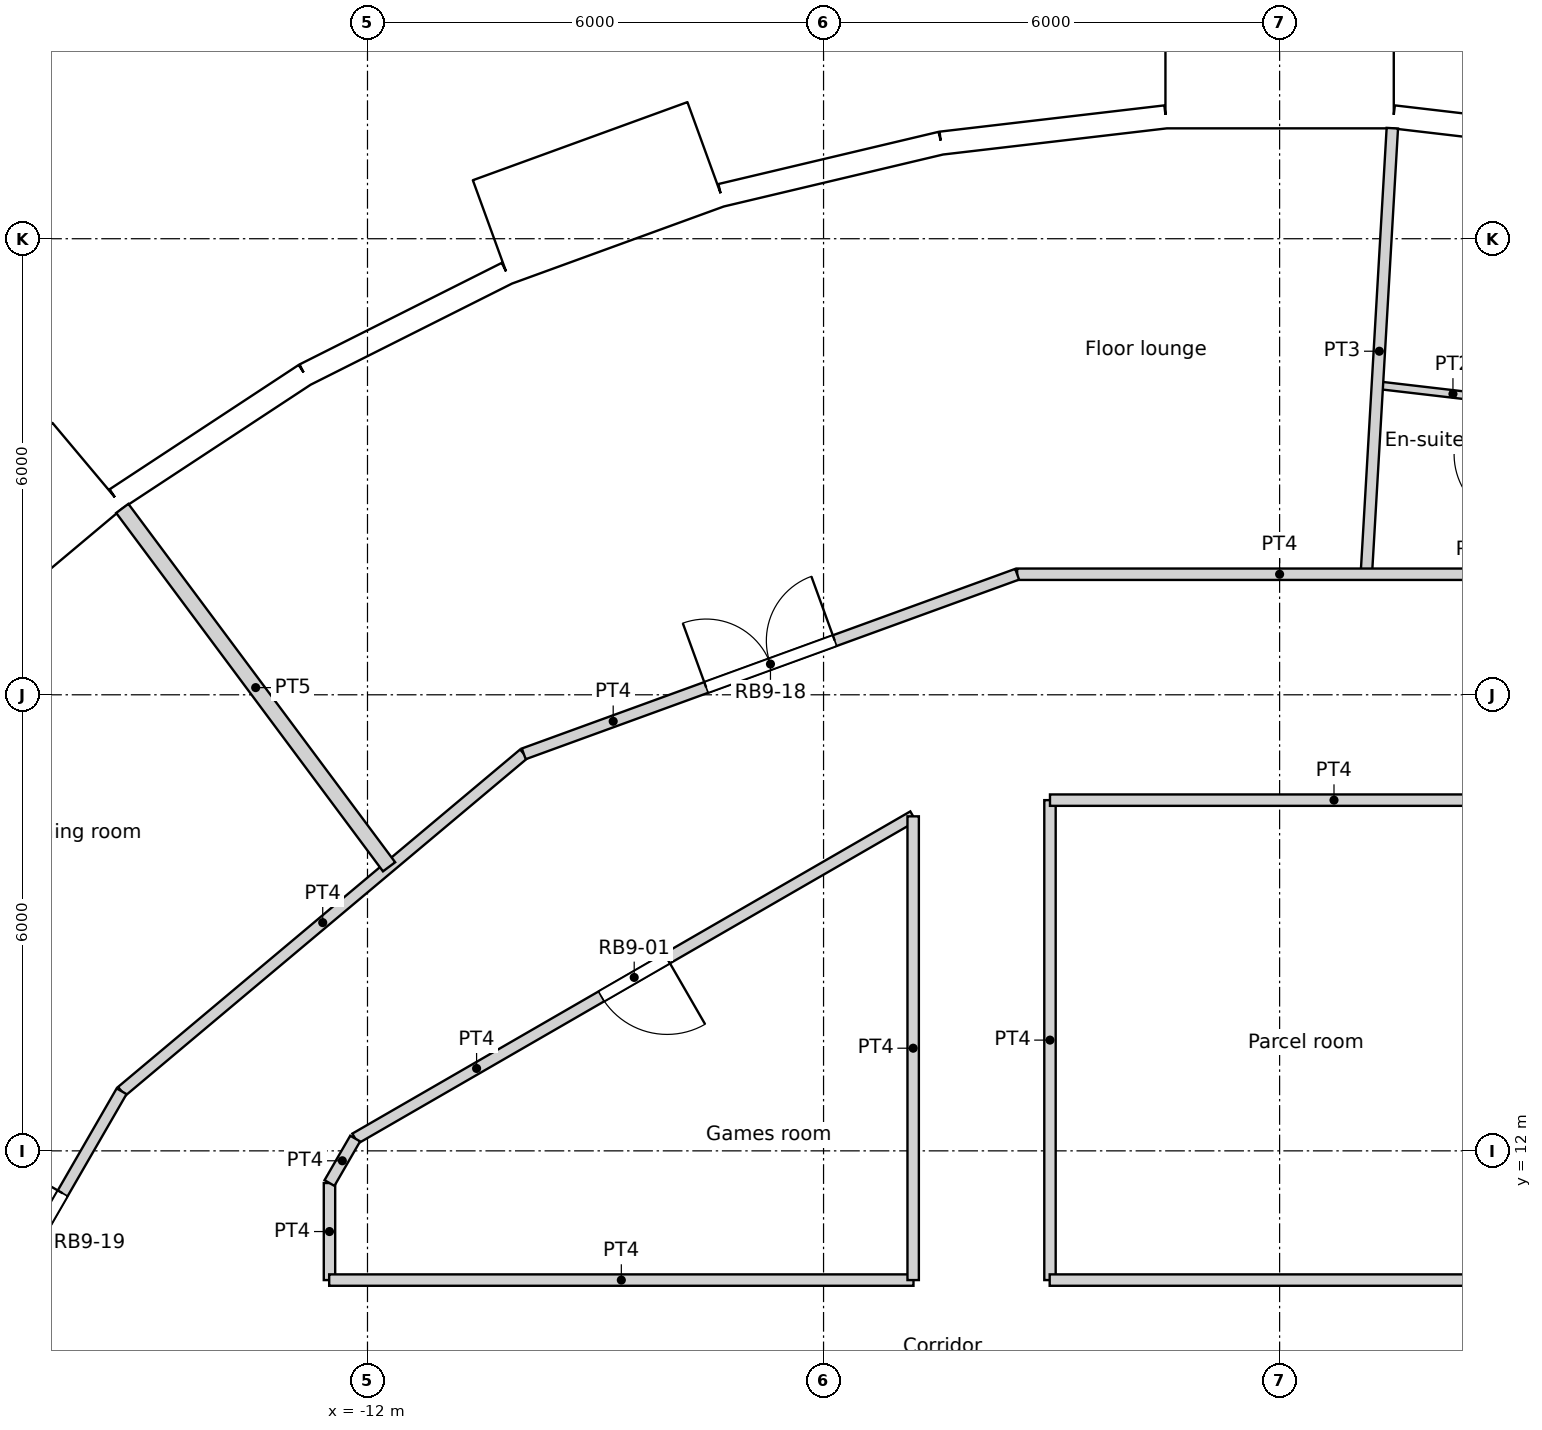
"""IFC4 building model, lengths in metres.
Left out: names, types, materials, properties, quantities, classifications, styles, units other than length and angle.
Written with IfcOpenShell. Run it as: python <this file> out.ifc"""

import sys

from ifc_helpers import new_model, si_unit, direction, frame, frame_2d, origin, origin_2d, place, context, subcontext, project, spatial, rectangle, circle, extrude, element, fill, save


model = new_model("IFC4")
c1 = context("Model", 3, precision=1e-05, world=origin(), true_north=direction((0.0, 1.0)))
c2 = subcontext(c1, "Body", "Model", "MODEL_VIEW")
j1 = project(units=[si_unit("LENGTHUNIT", "METRE"), si_unit("PLANEANGLEUNIT", "RADIAN")], contexts=[c1])
p1 = place(None, origin())
s1 = spatial("IfcSite", under=j1, at=p1, CompositionType="ELEMENT")
p2 = place(p1, origin())
s2 = spatial("IfcBuilding", under=s1, at=p2, CompositionType="ELEMENT")
p3 = place(p2, frame((0.0, 0.0, 212.4)))
s3 = spatial("IfcBuildingStorey", under=s2, at=p3, CompositionType="ELEMENT", Elevation=212.4)
for number, where, z_axis, x_axis in (
    (1, (-1.427, 24.506, 0.0), (0.0, 0.0, 1.0), (1.0, 0.0, 0.0)),
    (2, (-7.04, 23.516, 0.0), (0.0, 0.0, 1.0), (1.0, 0.0, 0.0)),
    (3, (-12.274, 21.259, 0.0), (0.0, 0.0, 1.0), (1.0, 0.0, 0.0)),
):
    element("IfcColumn", number, at=place(p3, frame(where, z_axis=z_axis, x_axis=x_axis)), inside=s3, PredefinedType="COLUMN", context=c2, shape_type="SweptSolid", body=[
        extrude(circle(Radius=0.6, at=origin_2d()), origin(), (0.0, 0.0, 1.0), 3.6),
    ])
for number, where, z_axis, x_axis in (
    (4, (1.406, 18.77, 0.0), (0.0, 0.0, 1.0), (1.0, 0.0, 0.0)),
    (5, (-4.188, 18.35, 0.0), (0.0, 0.0, 1.0), (1.0, 0.0, 0.0)),
    (6, (-9.411, 16.301, 0.0), (0.0, 0.0, 1.0), (1.0, 0.0, 0.0)),
    (7, (-13.798, 12.802, 0.0), (0.0, 0.0, 1.0), (1.0, 0.0, 0.0)),
):
    element("IfcColumn", number, at=place(p3, frame(where, z_axis=z_axis, x_axis=x_axis)), inside=s3, PredefinedType="COLUMN", context=c2, shape_type="SweptSolid", body=[
        extrude(circle(Radius=0.65, at=origin_2d()), origin(), (0.0, 0.0, 1.0), 3.6),
    ])
p4 = place(p3, frame((4.454, 25.258, 0.0), z_axis=(0.0, 0.0, 1.0), x_axis=(-0.993235542767, 0.116116995244, 0.0)))
e8 = element("IfcWall", 8, at=p4, inside=s3, PredefinedType="SOLIDWALL", context=c2, shape_type="SweptSolid", body=[
    extrude(rectangle(XDim=2.973, YDim=0.3, at=frame_2d((1.486, 0.0))), origin(), (0.0, 0.0, 1.0), 3.3),
])
p5 = place(p4, frame((1.486, 0.0, 1.55)))
e9 = element("IfcOpeningElement", 9, at=p5, cuts=e8, PredefinedType="OPENING", context=c2, shape_type="SweptSolid", body=[
    extrude(circle(Radius=0.9, at=origin_2d()), frame((0.0, 0.16, 0.0), z_axis=(0.0, -1.0, 0.0), x_axis=(1.0, 0.0, 0.0)), (0.0, 0.0, 1.0), 0.32),
])
p6 = place(p3, frame((1.5, 26.179, -0.3), z_axis=(0.0, 0.0, 1.0), x_axis=(-1.0, 0.0, 0.0)))
e10 = element("IfcWall", 10, at=p6, inside=s3, PredefinedType="ELEMENTEDWALL", context=c2, shape_type="SweptSolid", body=[
    extrude(rectangle(XDim=3.0, YDim=1.45, at=frame_2d((1.5, 0.0))), origin(), (0.0, 0.0, 1.0), 3.6),
])
p7 = place(p6, frame((1.5, 0.0, 1.85)))
e11 = element("IfcOpeningElement", 11, at=p7, cuts=e10, PredefinedType="OPENING", context=c2, shape_type="SweptSolid", body=[
    extrude(circle(Radius=0.9, at=origin_2d()), frame((0.0, 0.735, 0.0), z_axis=(0.0, -1.0, 0.0), x_axis=(1.0, 0.0, 0.0)), (0.0, 0.0, 1.0), 1.47),
])
p8 = place(p3, frame((-1.501, 25.603, 0.0), z_axis=(0.0, 0.0, 1.0), x_axis=(-0.993235542767, -0.116116995244, 0.0)))
e12 = element("IfcWall", 12, at=p8, inside=s3, PredefinedType="SOLIDWALL", context=c2, shape_type="SweptSolid", body=[
    extrude(rectangle(XDim=2.973, YDim=0.3, at=frame_2d((1.486, 0.0))), origin(), (0.0, 0.0, 1.0), 3.3),
])
p9 = place(p8, frame((1.486, 0.0, 1.55)))
e13 = element("IfcOpeningElement", 13, at=p9, cuts=e12, PredefinedType="OPENING", context=c2, shape_type="SweptSolid", body=[
    extrude(circle(Radius=0.9, at=origin_2d()), frame((0.0, 0.16, 0.0), z_axis=(0.0, -1.0, 0.0), x_axis=(1.0, 0.0, 0.0)), (0.0, 0.0, 1.0), 0.32),
])
p10 = place(p3, frame((-4.454, 25.258, 0.0), z_axis=(0.0, 0.0, 1.0), x_axis=(-0.973049746156, -0.230595298102, 0.0)))
e14 = element("IfcWall", 14, at=p10, inside=s3, PredefinedType="SOLIDWALL", context=c2, shape_type="SweptSolid", body=[
    extrude(rectangle(XDim=2.973, YDim=0.3, at=frame_2d((1.486, 0.0))), origin(), (0.0, 0.0, 1.0), 3.3),
])
p11 = place(p10, frame((1.486, 0.0, 1.55)))
e15 = element("IfcOpeningElement", 15, at=p11, cuts=e14, PredefinedType="OPENING", context=c2, shape_type="SweptSolid", body=[
    extrude(circle(Radius=0.9, at=origin_2d()), frame((0.0, 0.16, 0.0), z_axis=(0.0, -1.0, 0.0), x_axis=(1.0, 0.0, 0.0)), (0.0, 0.0, 1.0), 0.32),
])
p12 = place(p3, frame((-7.544, 25.113, -0.3), z_axis=(0.0, 0.0, 1.0), x_axis=(-0.939686455819, -0.342037080957, 0.0)))
e16 = element("IfcWall", 16, at=p12, inside=s3, PredefinedType="ELEMENTEDWALL", context=c2, shape_type="SweptSolid", body=[
    extrude(rectangle(XDim=3.0, YDim=1.45, at=frame_2d((1.5, 0.0))), origin(), (0.0, 0.0, 1.0), 3.6),
])
p13 = place(p12, frame((1.5, 0.0, 1.85)))
e17 = element("IfcOpeningElement", 17, at=p13, cuts=e16, PredefinedType="OPENING", context=c2, shape_type="SweptSolid", body=[
    extrude(circle(Radius=0.9, at=origin_2d()), frame((0.0, 0.735, 0.0), z_axis=(0.0, -1.0, 0.0), x_axis=(1.0, 0.0, 0.0)), (0.0, 0.0, 1.0), 1.47),
])
p14 = place(p3, frame((-10.167, 23.546, 0.0), z_axis=(0.0, 0.0, 1.0), x_axis=(-0.893637442555, -0.448789618045, 0.0)))
e18 = element("IfcWall", 18, at=p14, inside=s3, PredefinedType="SOLIDWALL", context=c2, shape_type="SweptSolid", body=[
    extrude(rectangle(XDim=2.973, YDim=0.3, at=frame_2d((1.486, 0.0))), origin(), (0.0, 0.0, 1.0), 3.3),
])
p15 = place(p14, frame((1.486, 0.0, 1.55)))
e19 = element("IfcOpeningElement", 19, at=p15, cuts=e18, PredefinedType="OPENING", context=c2, shape_type="SweptSolid", body=[
    extrude(circle(Radius=0.9, at=origin_2d()), frame((0.0, 0.16, 0.0), z_axis=(0.0, -1.0, 0.0), x_axis=(1.0, 0.0, 0.0)), (0.0, 0.0, 1.0), 0.32),
])
p16 = place(p3, frame((-12.824, 22.211, 0.0), z_axis=(0.0, 0.0, 1.0), x_axis=(-0.835470659512, -0.549535055382, 0.0)))
e20 = element("IfcWall", 20, at=p16, inside=s3, PredefinedType="SOLIDWALL", context=c2, shape_type="SweptSolid", body=[
    extrude(rectangle(XDim=2.973, YDim=0.3, at=frame_2d((1.487, 0.0))), origin(), (0.0, 0.0, 1.0), 3.3),
])
p17 = place(p16, frame((1.486, 0.0, 1.55)))
e21 = element("IfcOpeningElement", 21, at=p17, cuts=e20, PredefinedType="OPENING", context=c2, shape_type="SweptSolid", body=[
    extrude(circle(Radius=0.9, at=origin_2d()), frame((0.0, 0.16, 0.0), z_axis=(0.0, -1.0, 0.0), x_axis=(1.0, 0.0, 0.0)), (0.0, 0.0, 1.0), 0.32),
])
p18 = place(p3, frame((-15.678, 21.019, -0.3), z_axis=(0.0, 0.0, 1.0), x_axis=(-0.766022196139, -0.642814121673, 0.0)))
e22 = element("IfcWall", 22, at=p18, inside=s3, PredefinedType="ELEMENTEDWALL", context=c2, shape_type="SweptSolid", body=[
    extrude(rectangle(XDim=3.0, YDim=1.45, at=frame_2d((1.5, 0.0))), origin(), (0.0, 0.0, 1.0), 3.6),
])
p19 = place(p18, frame((1.5, 0.0, 1.85)))
e23 = element("IfcOpeningElement", 23, at=p19, cuts=e22, PredefinedType="OPENING", context=c2, shape_type="SweptSolid", body=[
    extrude(circle(Radius=0.9, at=origin_2d()), frame((0.0, 0.735, 0.0), z_axis=(0.0, -1.0, 0.0), x_axis=(1.0, 0.0, 0.0)), (0.0, 0.0, 1.0), 1.47),
])
p20 = place(p3, frame((-12.504, 10.3, 0.0), z_axis=(0.0, 0.0, 1.0), x_axis=(1.0, 0.0, 0.0)))
e24 = element("IfcWall", 24, at=p20, inside=s3, PredefinedType="PARTITIONING", context=c2, shape_type="SweptSolid", body=[
    extrude(rectangle(XDim=7.687, YDim=0.15, at=frame_2d((3.844, 0.0))), origin(), (0.0, 0.0, 1.0), 3.15),
])
p21 = place(p3, frame((-3.025, 10.3, 0.0), z_axis=(0.0, 0.0, 1.0), x_axis=(1.0, 0.0, 0.0)))
e25 = element("IfcWall", 25, at=p21, inside=s3, PredefinedType="PARTITIONING", context=c2, shape_type="SweptSolid", body=[
    extrude(rectangle(XDim=16.262, YDim=0.15, at=frame_2d((8.131, 0.0))), origin(), (0.0, 0.0, 1.0), 3.15),
])
p22 = place(p21, frame((7.288, 0.0, 0.0)))
e26 = element("IfcOpeningElement", 26, at=p22, cuts=e25, PredefinedType="OPENING", context=c2, shape_type="SweptSolid", body=[
    extrude(rectangle(XDim=0.95, YDim=2.1, at=frame_2d((0.475, 1.05))), frame((0.0, 0.075, 0.0), z_axis=(0.0, -1.0, 0.0), x_axis=(1.0, 0.0, 0.0)), (0.0, 0.0, 1.0), 0.15),
])
p23 = place(p3, frame((-4.821, 10.3, 0.0), z_axis=(0.0, 0.0, 1.0), x_axis=(0.0, 1.0, 0.0)))
e27 = element("IfcWall", 27, at=p23, inside=s3, PredefinedType="PARTITIONING", context=c2, shape_type="SweptSolid", body=[
    extrude(rectangle(XDim=6.101, YDim=0.15, at=frame_2d((3.05, 0.0))), origin(), (0.0, 0.0, 1.0), 3.15),
])
p24 = place(p3, frame((-12.162, 12.162, 0.0), z_axis=(0.0, 0.0, 1.0), x_axis=(0.866004766557, 0.500035743023, 0.0)))
e28 = element("IfcWall", 28, at=p24, inside=s3, PredefinedType="PARTITIONING", context=c2, shape_type="SweptSolid", body=[
    extrude(rectangle(XDim=8.477, YDim=0.15, at=frame_2d((4.239, 0.0))), origin(), (0.0, 0.0, 1.0), 3.15),
])
p25 = place(p24, frame((3.739, 0.0, 0.0)))
e29 = element("IfcOpeningElement", 29, at=p25, cuts=e28, PredefinedType="OPENING", context=c2, shape_type="SweptSolid", body=[
    extrude(rectangle(XDim=1.0, YDim=2.04, at=frame_2d((0.5, 1.02))), frame((0.0, 0.075, 0.0), z_axis=(0.0, -1.0, 0.0), x_axis=(1.0, 0.0, 0.0)), (0.0, 0.0, 1.0), 0.15),
])
p26 = place(p3, frame((-3.021, 16.614, 0.0), z_axis=(0.0, 0.0, 1.0), x_axis=(1.0, 0.0, 0.0)))
e30 = element("IfcWall", 30, at=p26, inside=s3, PredefinedType="PARTITIONING", context=c2, shape_type="SweptSolid", body=[
    extrude(rectangle(XDim=7.473, YDim=0.15, at=frame_2d((3.736, 0.0))), origin(), (0.0, 0.0, 1.0), 3.15),
])
p27 = place(p3, frame((-3.021, 10.3, 0.0), z_axis=(0.0, 0.0, 1.0), x_axis=(0.0, 1.0, 0.0)))
e31 = element("IfcWall", 31, at=p27, inside=s3, PredefinedType="PARTITIONING", context=c2, shape_type="SweptSolid", body=[
    extrude(rectangle(XDim=6.314, YDim=0.15, at=frame_2d((3.157, 0.0))), origin(), (0.0, 0.0, 1.0), 3.15),
])
p28 = place(p3, frame((-3.453, 19.586, 0.0), z_axis=(0.0, 0.0, 1.0), x_axis=(1.0, 0.0, 0.0)))
e32 = element("IfcWall", 32, at=p28, inside=s3, PredefinedType="PARTITIONING", context=c2, shape_type="SweptSolid", body=[
    extrude(rectangle(XDim=6.906, YDim=0.15, at=frame_2d((3.453, 0.0))), origin(), (0.0, 0.0, 1.0), 3.15),
])
p29 = place(p3, frame((-15.234, 12.783, 0.0), z_axis=(0.0, 0.0, 1.0), x_axis=(0.765936018543, 0.642916802937, 0.0)))
e33 = element("IfcWall", 33, at=p29, inside=s3, PredefinedType="PARTITIONING", context=c2, shape_type="SweptSolid", body=[
    extrude(rectangle(XDim=6.906, YDim=0.15, at=frame_2d((3.453, 0.0))), origin(), (0.0, 0.0, 1.0), 3.15),
])
p30 = place(p3, frame((-9.944, 17.223, 0.0), z_axis=(0.0, 0.0, 1.0), x_axis=(0.939672634566, 0.342075050021, 0.0)))
e34 = element("IfcWall", 34, at=p30, inside=s3, PredefinedType="PARTITIONING", context=c2, shape_type="SweptSolid", body=[
    extrude(rectangle(XDim=6.908, YDim=0.15, at=frame_2d((3.454, 0.0))), origin(), (0.0, 0.0, 1.0), 3.15),
])
p31 = place(p30, frame((2.554, 0.0, 0.0)))
e35 = element("IfcOpeningElement", 35, at=p31, cuts=e34, PredefinedType="OPENING", context=c2, shape_type="SweptSolid", body=[
    extrude(rectangle(XDim=1.8, YDim=2.1, at=frame_2d((0.9, 1.05))), frame((0.0, 0.075, 0.0), z_axis=(0.0, -1.0, 0.0), x_axis=(1.0, 0.0, 0.0)), (0.0, 0.0, 1.0), 0.15),
])
p32 = place(p3, frame((-12.5, 11.577, 0.0), z_axis=(0.0, 0.0, 1.0), x_axis=(0.500024767483, 0.866011103799, 0.0)))
e36 = element("IfcWall", 36, at=p32, inside=s3, PredefinedType="PARTITIONING", context=c2, shape_type="SweptSolid", body=[
    extrude(rectangle(XDim=0.676, YDim=0.15, at=frame_2d((0.338, 0.0))), origin(), (0.0, 0.0, 1.0), 3.15),
])
p33 = place(p3, frame((-12.5, 10.3, 0.0), z_axis=(0.0, 0.0, 1.0), x_axis=(0.0, 1.0, 0.0)))
e37 = element("IfcWall", 37, at=p33, inside=s3, PredefinedType="PARTITIONING", context=c2, shape_type="SweptSolid", body=[
    extrude(rectangle(XDim=1.277, YDim=0.15, at=frame_2d((0.638, 0.0))), origin(), (0.0, 0.0, 1.0), 3.15),
])
p34 = place(p3, frame((-18.688, 6.802, 0.0), z_axis=(0.0, 0.0, 1.0), x_axis=(0.499914202267, 0.866074933462, 0.0)))
e38 = element("IfcWall", 38, at=p34, inside=s3, PredefinedType="PARTITIONING", context=c2, shape_type="SweptSolid", body=[
    extrude(rectangle(XDim=6.907, YDim=0.15, at=frame_2d((3.454, 0.0))), origin(), (0.0, 0.0, 1.0), 3.15),
])
p35 = place(p34, frame((3.857, 0.0, 0.0)))
e39 = element("IfcOpeningElement", 39, at=p35, cuts=e38, PredefinedType="OPENING", context=c2, shape_type="SweptSolid", body=[
    extrude(rectangle(XDim=1.5, YDim=2.1, at=frame_2d((0.75, 1.05))), frame((0.0, 0.075, 0.0), z_axis=(0.0, -1.0, 0.0), x_axis=(1.0, 0.0, 0.0)), (0.0, 0.0, 1.0), 0.15),
])
p36 = place(p3, frame((1.286, 22.074, 0.0), z_axis=(0.0, 0.0, 1.0), x_axis=(0.993269919916, -0.115822563388, 0.0)))
e40 = element("IfcWall", 40, at=p36, inside=s3, PredefinedType="PARTITIONING", context=c2, shape_type="SweptSolid", body=[
    extrude(rectangle(XDim=2.002, YDim=0.1, at=frame_2d((1.001, 0.0))), origin(), (0.0, 0.0, 1.0), 3.15),
])
p37 = place(p3, frame((1.141, 19.586, 0.0), z_axis=(0.0, 0.0, 1.0), x_axis=(0.058147412668, 0.998308007781, 0.0)))
e41 = element("IfcWall", 41, at=p37, inside=s3, PredefinedType="PARTITIONING", context=c2, shape_type="SweptSolid", body=[
    extrude(rectangle(XDim=5.878, YDim=0.15, at=frame_2d((2.939, 0.0))), origin(), (0.0, 0.0, 1.0), 3.15),
])
p38 = place(p3, frame((-15.226, 20.452, 0.0), z_axis=(0.0, 0.0, 1.0), x_axis=(0.597151875745, -0.802128192557, 0.0)))
e42 = element("IfcWall", 42, at=p38, inside=s3, PredefinedType="PARTITIONING", context=c2, shape_type="SweptSolid", body=[
    extrude(rectangle(XDim=5.878, YDim=0.2, at=frame_2d((2.939, 0.0))), origin(), (0.0, 0.0, 1.0), 3.15),
])
p39 = place(p5, origin())
e43 = element("IfcWindow", 43, at=p39, inside=s3, PartitioningType="SINGLE_PANEL", PredefinedType="WINDOW", context=c2, shape_type="SweptSolid", body=[
    extrude(circle(Radius=0.9, at=origin_2d()), frame((0.0, 0.12, 0.0), z_axis=(0.0, -1.0, 0.0), x_axis=(1.0, 0.0, 0.0)), (0.0, 0.0, 1.0), 0.1),
])
fill(e9, e43)
p40 = place(p7, origin())
e44 = element("IfcWindow", 44, at=p40, inside=s3, PartitioningType="SINGLE_PANEL", PredefinedType="WINDOW", context=c2, shape_type="SweptSolid", body=[
    extrude(circle(Radius=0.9, at=origin_2d()), frame((0.0, 0.695, 0.0), z_axis=(0.0, -1.0, 0.0), x_axis=(1.0, 0.0, 0.0)), (0.0, 0.0, 1.0), 0.1),
])
fill(e11, e44)
p41 = place(p9, origin())
e45 = element("IfcWindow", 45, at=p41, inside=s3, PartitioningType="SINGLE_PANEL", PredefinedType="WINDOW", context=c2, shape_type="SweptSolid", body=[
    extrude(circle(Radius=0.9, at=origin_2d()), frame((0.0, 0.12, 0.0), z_axis=(0.0, -1.0, 0.0), x_axis=(1.0, 0.0, 0.0)), (0.0, 0.0, 1.0), 0.1),
])
fill(e13, e45)
p42 = place(p11, origin())
e46 = element("IfcWindow", 46, at=p42, inside=s3, PartitioningType="SINGLE_PANEL", PredefinedType="WINDOW", context=c2, shape_type="SweptSolid", body=[
    extrude(circle(Radius=0.9, at=origin_2d()), frame((0.0, 0.12, 0.0), z_axis=(0.0, -1.0, 0.0), x_axis=(1.0, 0.0, 0.0)), (0.0, 0.0, 1.0), 0.1),
])
fill(e15, e46)
p43 = place(p13, origin())
e47 = element("IfcWindow", 47, at=p43, inside=s3, PartitioningType="SINGLE_PANEL", PredefinedType="WINDOW", context=c2, shape_type="SweptSolid", body=[
    extrude(circle(Radius=0.9, at=origin_2d()), frame((0.0, 0.695, 0.0), z_axis=(0.0, -1.0, 0.0), x_axis=(1.0, 0.0, 0.0)), (0.0, 0.0, 1.0), 0.1),
])
fill(e17, e47)
p44 = place(p15, origin())
e48 = element("IfcWindow", 48, at=p44, inside=s3, PartitioningType="SINGLE_PANEL", PredefinedType="WINDOW", context=c2, shape_type="SweptSolid", body=[
    extrude(circle(Radius=0.9, at=origin_2d()), frame((0.0, 0.12, 0.0), z_axis=(0.0, -1.0, 0.0), x_axis=(1.0, 0.0, 0.0)), (0.0, 0.0, 1.0), 0.1),
])
fill(e19, e48)
p45 = place(p17, origin())
e49 = element("IfcWindow", 49, at=p45, inside=s3, PartitioningType="SINGLE_PANEL", PredefinedType="WINDOW", context=c2, shape_type="SweptSolid", body=[
    extrude(circle(Radius=0.9, at=origin_2d()), frame((0.0, 0.12, 0.0), z_axis=(0.0, -1.0, 0.0), x_axis=(1.0, 0.0, 0.0)), (0.0, 0.0, 1.0), 0.1),
])
fill(e21, e49)
p46 = place(p19, origin())
e50 = element("IfcWindow", 50, at=p46, inside=s3, PartitioningType="SINGLE_PANEL", PredefinedType="WINDOW", context=c2, shape_type="SweptSolid", body=[
    extrude(circle(Radius=0.9, at=origin_2d()), frame((0.0, 0.695, 0.0), z_axis=(0.0, -1.0, 0.0), x_axis=(1.0, 0.0, 0.0)), (0.0, 0.0, 1.0), 0.1),
])
fill(e23, e50)
p47 = place(p25, origin())
e51 = element("IfcDoor", 51, at=p47, inside=s3, OperationType="SINGLE_SWING_LEFT", PredefinedType="DOOR", context=c2, shape_type="SweptSolid", body=[
    extrude(rectangle(XDim=1.0, YDim=2.04, at=frame_2d((0.5, 1.02))), frame((0.0, 0.025, 0.0), z_axis=(0.0, -1.0, 0.0), x_axis=(1.0, 0.0, 0.0)), (0.0, 0.0, 1.0), 0.05),
])
fill(e29, e51)
p48 = place(p31, origin())
e52 = element("IfcDoor", 52, at=p48, inside=s3, OperationType="DOUBLE_DOOR_SINGLE_SWING", PredefinedType="DOOR", context=c2, shape_type="SweptSolid", body=[
    extrude(rectangle(XDim=1.8, YDim=2.1, at=frame_2d((0.9, 1.05))), frame((0.0, 0.025, 0.0), z_axis=(0.0, -1.0, 0.0), x_axis=(1.0, 0.0, 0.0)), (0.0, 0.0, 1.0), 0.05),
])
fill(e35, e52)
p49 = place(p35, origin())
e53 = element("IfcDoor", 53, at=p49, inside=s3, OperationType="DOUBLE_DOOR_SINGLE_SWING", PredefinedType="DOOR", context=c2, shape_type="SweptSolid", body=[
    extrude(rectangle(XDim=1.5, YDim=2.1, at=frame_2d((0.75, 1.05))), frame((0.0, 0.025, 0.0), z_axis=(0.0, -1.0, 0.0), x_axis=(1.0, 0.0, 0.0)), (0.0, 0.0, 1.0), 0.05),
])
fill(e39, e53)
save(model, sys.argv[1])
